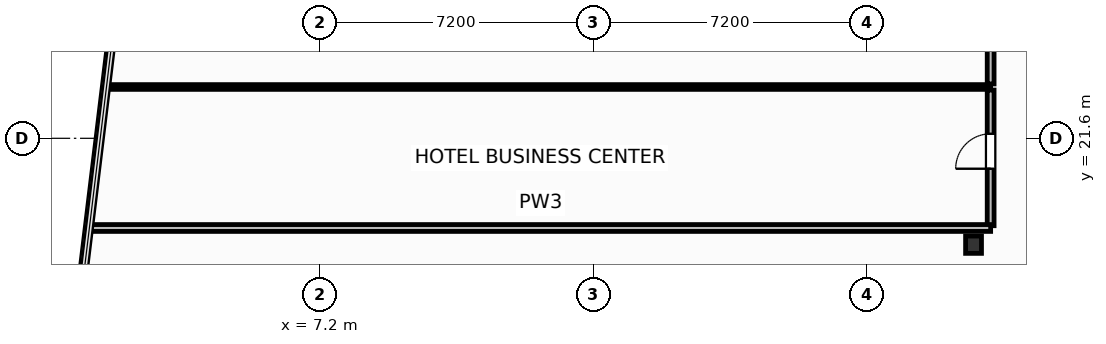
"""IFC4 building model, lengths in metres.
Left out: names, types, materials, properties, quantities, classifications, styles, units other than length and angle.
Written with IfcOpenShell. Run it as: python <this file> out.ifc"""

import sys

from ifc_helpers import new_model, si_unit, direction, frame, frame_2d, origin, origin_2d, place, context, subcontext, project, spatial, rectangle, i_section, extrude, element, fill, save


model = new_model("IFC4")
c1 = context("Model", 3, precision=1e-05, world=origin(), true_north=direction((0.0, 1.0)))
c2 = subcontext(c1, "Body", "Model", "MODEL_VIEW")
j1 = project(units=[si_unit("LENGTHUNIT", "METRE"), si_unit("PLANEANGLEUNIT", "RADIAN")], contexts=[c1])
p1 = place(None, origin())
s1 = spatial("IfcSite", under=j1, at=p1, CompositionType="ELEMENT")
p2 = place(p1, origin())
s2 = spatial("IfcBuilding", under=s1, at=p2, CompositionType="ELEMENT")
p3 = place(p2, frame((0.0, 0.0, 151.3)))
s3 = spatial("IfcBuildingStorey", under=s2, at=p3, CompositionType="ELEMENT", Elevation=151.3)
p4 = place(p3, frame((24.4, 18.8, 0.0), z_axis=(0.0, 0.0, 1.0), x_axis=(1.0, 0.0, 0.0)))
e1 = element("IfcColumn", 1, at=p4, inside=s3, PredefinedType="COLUMN", context=c2, shape_type="SweptSolid", body=[
    extrude(i_section(OverallWidth=0.418, OverallDepth=0.455, WebThickness=0.042, FlangeThickness=0.068, FilletRadius=0.025, at=origin_2d()), origin(), (0.0, 0.0, 1.0), 3.7),
])
p5 = place(p3, frame((24.85, 19.3, 0.0), z_axis=(0.0, 0.0, 1.0), x_axis=(0.0, 1.0, 0.0)))
e2 = element("IfcWall", 2, at=p5, inside=s3, PredefinedType="PARTITIONING", context=c2, shape_type="SweptSolid", body=[
    extrude(rectangle(XDim=3.57, YDim=0.18, at=frame_2d((1.785, 0.0))), origin(), (0.0, 0.0, 1.0), 3.45),
])
p6 = place(p5, frame((1.5, 0.0, 0.0)))
e3 = element("IfcOpeningElement", 3, at=p6, cuts=e2, PredefinedType="OPENING", context=c2, shape_type="SweptSolid", body=[
    extrude(rectangle(XDim=0.92, YDim=2.05, at=frame_2d((0.46, 1.025))), frame((0.0, 0.1, 0.0), z_axis=(0.0, -1.0, 0.0), x_axis=(1.0, 0.0, 0.0)), (0.0, 0.0, 1.0), 0.2),
])
p7 = place(p3, frame((24.85, 23.03, 0.0), z_axis=(0.0, 0.0, 1.0), x_axis=(0.0, 1.0, 0.0)))
e4 = element("IfcWall", 4, at=p7, inside=s3, PredefinedType="PARTITIONING", context=c2, shape_type="SweptSolid", body=[
    extrude(rectangle(XDim=3.57, YDim=0.18, at=frame_2d((1.785, 0.0))), origin(), (0.0, 0.0, 1.0), 3.45),
])
p8 = place(p7, frame((1.5, 0.0, 0.0)))
e5 = element("IfcOpeningElement", 5, at=p8, cuts=e4, PredefinedType="OPENING", context=c2, shape_type="SweptSolid", body=[
    extrude(rectangle(XDim=0.92, YDim=2.05, at=frame_2d((0.46, 1.025))), frame((0.0, 0.1, 0.0), z_axis=(0.0, -1.0, 0.0), x_axis=(1.0, 0.0, 0.0)), (0.0, 0.0, 1.0), 0.2),
])
p9 = place(p3, frame((1.624, 22.95, 0.0), z_axis=(0.0, 0.0, 1.0), x_axis=(1.0, 0.0, 0.0)))
e6 = element("IfcWall", 6, at=p9, inside=s3, PredefinedType="PARTITIONING", context=c2, shape_type="SweptSolid", body=[
    extrude(rectangle(XDim=23.226, YDim=0.125, at=frame_2d((11.613, 0.0))), origin(), (0.0, 0.0, 1.0), 3.45),
])
p10 = place(p3, frame((1.174, 19.24, 0.0), z_axis=(0.0, 0.0, 1.0), x_axis=(1.0, 0.0, 0.0)))
e7 = element("IfcWall", 7, at=p10, inside=s3, PredefinedType="PARTITIONING", context=c2, shape_type="SweptSolid", body=[
    extrude(rectangle(XDim=23.676, YDim=0.18, at=frame_2d((11.838, 0.0))), origin(), (0.0, 0.0, 1.0), 3.45),
])
p11 = place(p6, origin())
e8 = element("IfcDoor", 8, at=p11, inside=s3, OperationType="SINGLE_SWING_LEFT", PredefinedType="DOOR", context=c2, shape_type="SweptSolid", body=[
    extrude(rectangle(XDim=0.92, YDim=2.05, at=frame_2d((0.46, 1.025))), frame((0.0, 0.025, 0.0), z_axis=(0.0, -1.0, 0.0), x_axis=(1.0, 0.0, 0.0)), (0.0, 0.0, 1.0), 0.05),
])
fill(e3, e8)
save(model, sys.argv[1])
